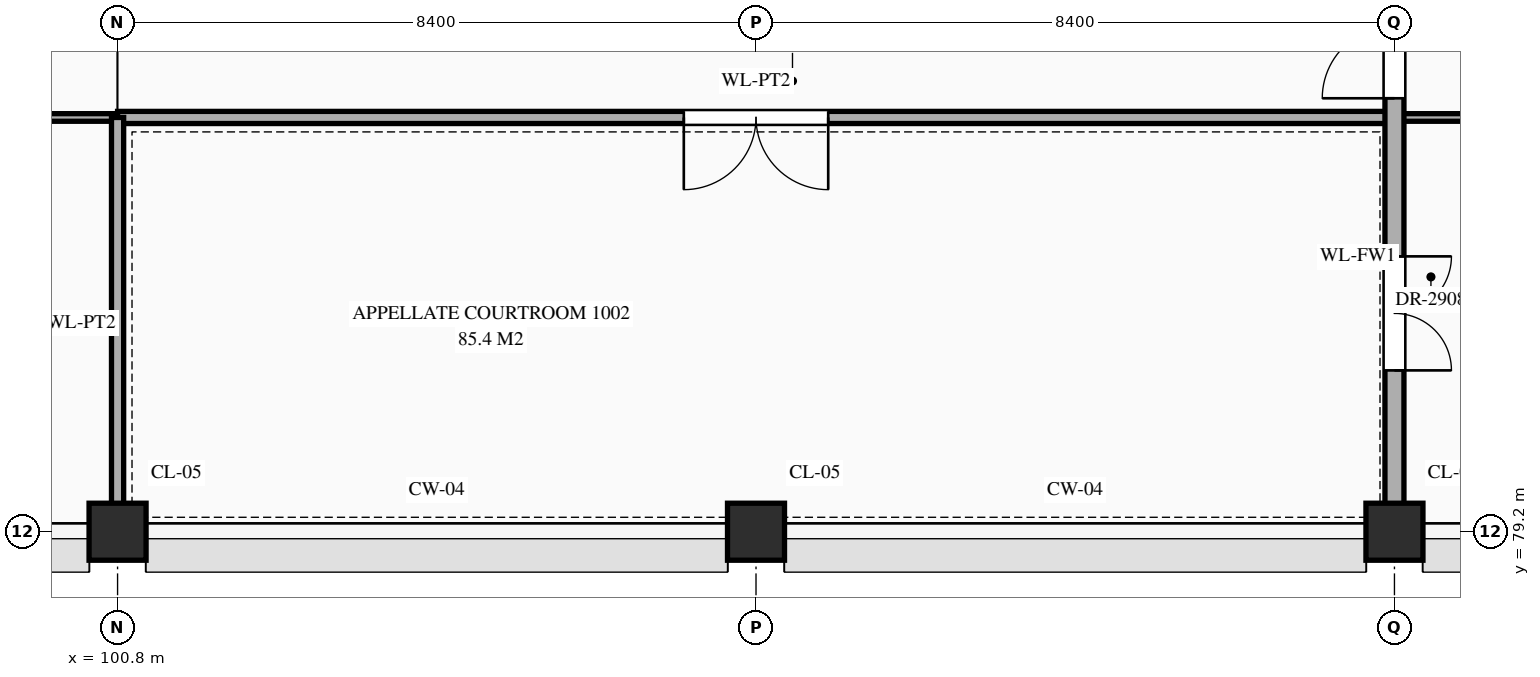
"""IFC4 building model, lengths in metres.
Left out: names, types, materials, properties, quantities, classifications, styles, units other than length and angle.
Written with IfcOpenShell. Run it as: python <this file> out.ifc"""

import sys

from ifc_helpers import new_model, si_unit, direction, frame, frame_2d, origin, origin_2d, place, context, subcontext, project, spatial, rectangle, extrude, element, fill, save


model = new_model("IFC4")
c1 = context("Model", 3, precision=1e-05, world=origin(), true_north=direction((0.0, 1.0)))
c2 = subcontext(c1, "Body", "Model", "MODEL_VIEW")
j1 = project(units=[si_unit("LENGTHUNIT", "METRE"), si_unit("PLANEANGLEUNIT", "RADIAN")], contexts=[c1])
p1 = place(None, origin())
s1 = spatial("IfcSite", under=j1, at=p1, CompositionType="ELEMENT")
p2 = place(p1, origin())
s2 = spatial("IfcBuilding", under=s1, at=p2, CompositionType="ELEMENT")
p3 = place(p2, frame((0.0, 0.0, 43.5)))
s3 = spatial("IfcBuildingStorey", under=s2, at=p3, CompositionType="ELEMENT", Elevation=43.5)
for number, where, z_axis, x_axis in (
    (1, (100.8, 79.2, 0.0), (0.0, 0.0, 1.0), (1.0, 0.0, 0.0)),
    (2, (109.2, 79.2, 0.0), (0.0, 0.0, 1.0), (1.0, 0.0, 0.0)),
    (3, (117.6, 79.2, 0.0), (0.0, 0.0, 1.0), (1.0, 0.0, 0.0)),
):
    element("IfcColumn", number, at=place(p3, frame(where, z_axis=z_axis, x_axis=x_axis)), inside=s3, PredefinedType="COLUMN", context=c2, shape_type="SweptSolid", body=[
        extrude(rectangle(XDim=0.75, YDim=0.75, at=origin_2d()), origin(), (0.0, 0.0, 1.0), 4.2),
    ])
p4 = place(p3, frame((67.2, 84.65, 0.0), z_axis=(0.0, 0.0, 1.0), x_axis=(1.0, 0.0, 0.0)))
e4 = element("IfcWall", 4, at=p4, inside=s3, PredefinedType="STANDARD", context=c2, shape_type="SweptSolid", body=[
    extrude(rectangle(XDim=33.6, YDim=0.1, at=frame_2d((16.8, 0.0))), origin(), (0.0, 0.0, 1.0), 3.95),
])
p5 = place(p4, frame((7.625, 0.0, 0.0)))
e5 = element("IfcOpeningElement", 5, at=p5, cuts=e4, PredefinedType="OPENING", context=c2, shape_type="SweptSolid", body=[
    extrude(rectangle(XDim=1.55, YDim=2.35, at=frame_2d((0.775, 1.175))), frame((0.0, 0.062, 0.0), z_axis=(0.0, -1.0, 0.0), x_axis=(1.0, 0.0, 0.0)), (0.0, 0.0, 1.0), 0.124),
])
p6 = place(p4, frame((24.475, 0.0, 0.0)))
e6 = element("IfcOpeningElement", 6, at=p6, cuts=e4, PredefinedType="OPENING", context=c2, shape_type="SweptSolid", body=[
    extrude(rectangle(XDim=1.45, YDim=2.3, at=frame_2d((0.725, 1.15))), frame((0.0, 0.062, 0.0), z_axis=(0.0, -1.0, 0.0), x_axis=(1.0, 0.0, 0.0)), (0.0, 0.0, 1.0), 0.124),
])
p7 = place(p3, frame((100.8, 84.65, 0.0), z_axis=(0.0, 0.0, 1.0), x_axis=(1.0, 0.0, 0.0)))
e7 = element("IfcWall", 7, at=p7, inside=s3, PredefinedType="STANDARD", context=c2, shape_type="SweptSolid", body=[
    extrude(rectangle(XDim=16.8, YDim=0.16, at=frame_2d((8.4, 0.0))), origin(), (0.0, 0.0, 1.0), 3.95),
])
p8 = place(p7, frame((7.45, 0.0, 0.0)))
e8 = element("IfcOpeningElement", 8, at=p8, cuts=e7, PredefinedType="OPENING", context=c2, shape_type="SweptSolid", body=[
    extrude(rectangle(XDim=1.9, YDim=2.5, at=frame_2d((0.95, 1.25))), frame((0.0, 0.092, 0.0), z_axis=(0.0, -1.0, 0.0), x_axis=(1.0, 0.0, 0.0)), (0.0, 0.0, 1.0), 0.184),
])
p9 = place(p3, frame((117.6, 84.65, 0.0), z_axis=(0.0, 0.0, 1.0), x_axis=(1.0, 0.0, 0.0)))
e9 = element("IfcWall", 9, at=p9, inside=s3, PredefinedType="STANDARD", context=c2, shape_type="SweptSolid", body=[
    extrude(rectangle(XDim=8.36, YDim=0.1, at=frame_2d((4.18, 0.0))), origin(), (0.0, 0.0, 1.0), 4.0),
])
p10 = place(p9, frame((3.28, 0.0, 0.0)))
e10 = element("IfcOpeningElement", 10, at=p10, cuts=e9, PredefinedType="OPENING", context=c2, shape_type="SweptSolid", body=[
    extrude(rectangle(XDim=1.8, YDim=2.5, at=frame_2d((0.9, 1.25))), frame((0.0, 0.062, 0.0), z_axis=(0.0, -1.0, 0.0), x_axis=(1.0, 0.0, 0.0)), (0.0, 0.0, 1.0), 0.124),
])
p11 = place(p3, frame((100.8, 79.24, 0.0), z_axis=(0.0, 0.0, 1.0), x_axis=(0.0, 1.0, 0.0)))
e11 = element("IfcWall", 11, at=p11, inside=s3, PredefinedType="STANDARD", context=c2, shape_type="SweptSolid", body=[
    extrude(rectangle(XDim=5.41, YDim=0.16, at=frame_2d((2.705, 0.0))), origin(), (0.0, 0.0, 1.0), 3.2),
])
p12 = place(p3, frame((117.6, 79.24, 0.0), z_axis=(0.0, 0.0, 1.0), x_axis=(0.0, 1.0, 0.0)))
e12 = element("IfcWall", 12, at=p12, inside=s3, PredefinedType="STANDARD", context=c2, shape_type="SweptSolid", body=[
    extrude(rectangle(XDim=7.16, YDim=0.25, at=frame_2d((3.58, 0.0))), origin(), (0.0, 0.0, 1.0), 3.2),
])
p13 = place(p12, frame((5.663, 0.0, 0.0)))
e13 = element("IfcOpeningElement", 13, at=p13, cuts=e12, PredefinedType="OPENING", context=c2, shape_type="SweptSolid", body=[
    extrude(rectangle(XDim=0.95, YDim=2.15, at=frame_2d((0.475, 1.075))), frame((0.0, 0.137, 0.0), z_axis=(0.0, -1.0, 0.0), x_axis=(1.0, 0.0, 0.0)), (0.0, 0.0, 1.0), 0.274),
])
p14 = place(p12, frame((2.083, 0.0, 0.0)))
e14 = element("IfcOpeningElement", 14, at=p14, cuts=e12, PredefinedType="OPENING", context=c2, shape_type="SweptSolid", body=[
    extrude(rectangle(XDim=1.5, YDim=2.25, at=frame_2d((0.75, 1.125))), frame((0.0, 0.137, 0.0), z_axis=(0.0, -1.0, 0.0), x_axis=(1.0, 0.0, 0.0)), (0.0, 0.0, 1.0), 0.274),
])
p15 = place(p13, origin())
e15 = element("IfcDoor", 15, at=p15, inside=s3, OperationType="SINGLE_SWING_LEFT", PredefinedType="DOOR", context=c2, shape_type="SweptSolid", body=[
    extrude(rectangle(XDim=0.95, YDim=2.15, at=frame_2d((0.475, 1.075))), frame((0.0, 0.025, 0.0), z_axis=(0.0, -1.0, 0.0), x_axis=(1.0, 0.0, 0.0)), (0.0, 0.0, 1.0), 0.05),
])
fill(e13, e15)
p16 = place(p8, frame((1.9, 0.0, 0.0), z_axis=(0.0, 0.0, 1.0), x_axis=(-1.0, 0.0, 0.0)))
e16 = element("IfcDoor", 16, at=p16, inside=s3, OperationType="DOUBLE_DOOR_SINGLE_SWING", PredefinedType="DOOR", context=c2, shape_type="SweptSolid", body=[
    extrude(rectangle(XDim=1.9, YDim=2.5, at=frame_2d((0.95, 1.25))), frame((0.0, 0.025, 0.0), z_axis=(0.0, -1.0, 0.0), x_axis=(1.0, 0.0, 0.0)), (0.0, 0.0, 1.0), 0.05),
])
fill(e8, e16)
p17 = place(p14, frame((1.5, 0.0, 0.0), z_axis=(0.0, 0.0, 1.0), x_axis=(-1.0, 0.0, 0.0)))
e17 = element("IfcDoor", 17, at=p17, inside=s3, OperationType="DOUBLE_DOOR_SINGLE_SWING", PredefinedType="DOOR", context=c2, shape_type="SweptSolid", body=[
    extrude(rectangle(XDim=1.5, YDim=2.25, at=frame_2d((0.75, 1.125))), frame((0.0, 0.025, 0.0), z_axis=(0.0, -1.0, 0.0), x_axis=(1.0, 0.0, 0.0)), (0.0, 0.0, 1.0), 0.05),
])
fill(e14, e17)
save(model, sys.argv[1])
